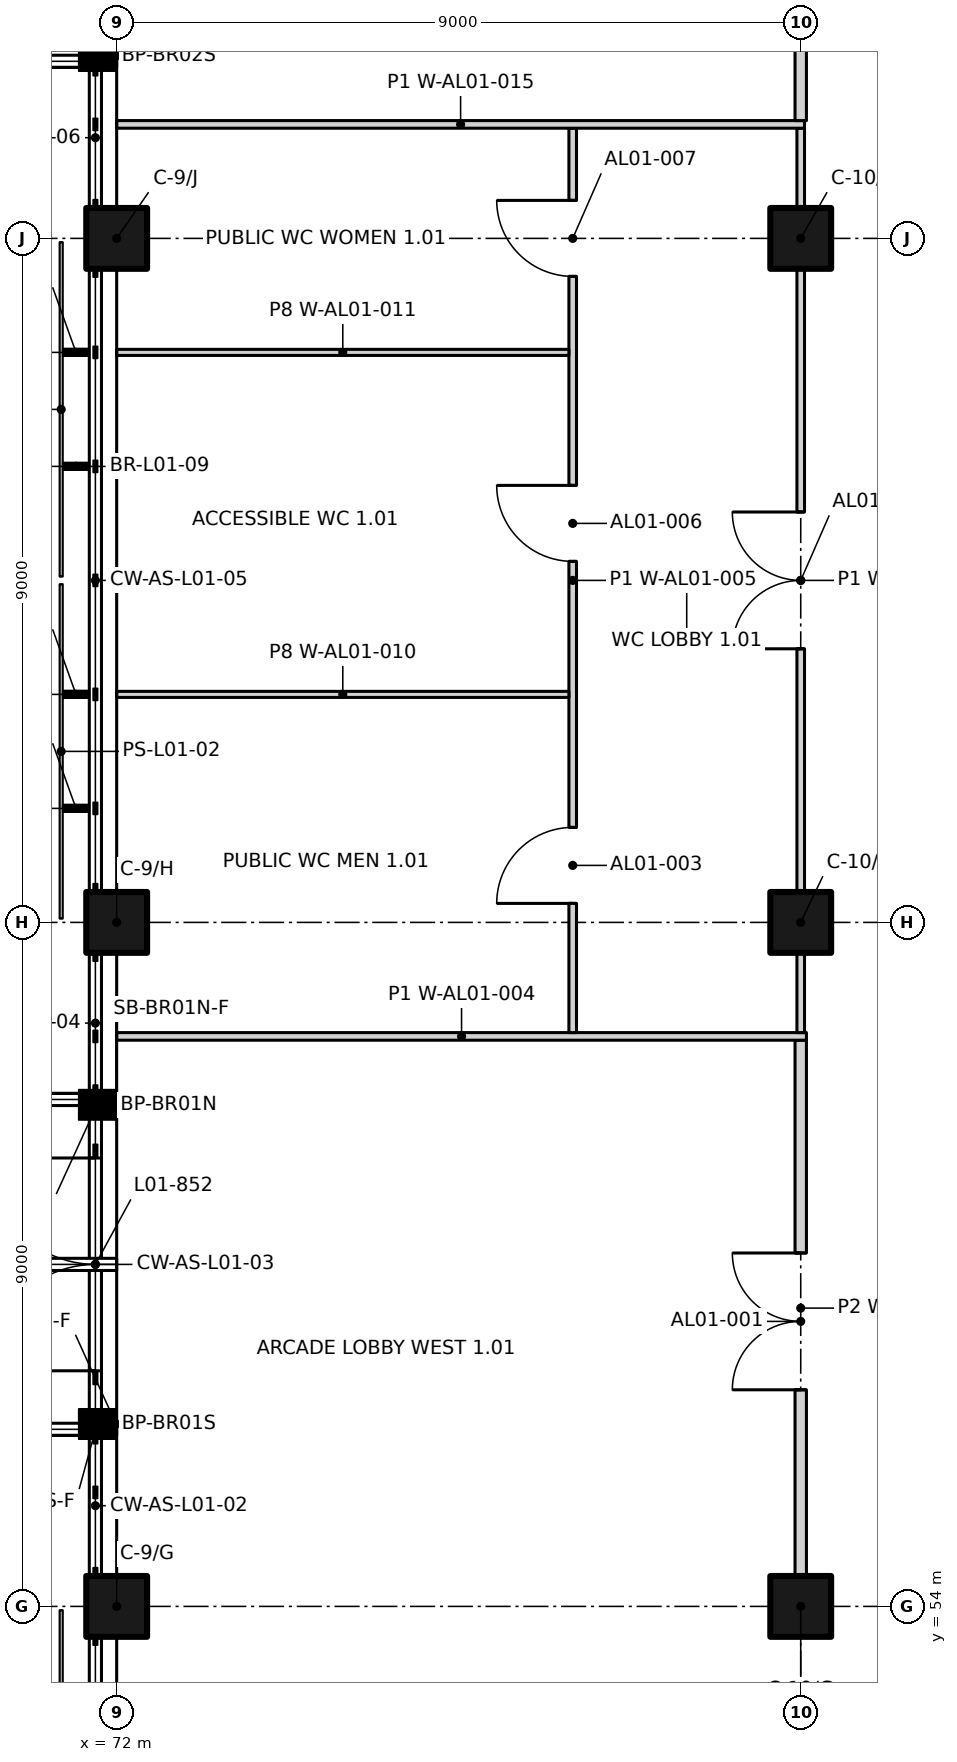
"""IFC4 building model, lengths in metres.
Left out: names, types, materials, properties, quantities, classifications, styles, units other than length and angle.
Written with IfcOpenShell. Run it as: python <this file> out.ifc"""

import sys

from ifc_helpers import new_model, si_unit, direction, frame, frame_2d, origin, origin_2d, place, context, subcontext, project, spatial, rectangle, extrude, element, fill, save


model = new_model("IFC4")
c1 = context("Model", 3, precision=1e-05, world=origin(), true_north=direction((0.0, 1.0)))
c2 = subcontext(c1, "Body", "Model", "MODEL_VIEW")
j1 = project(units=[si_unit("LENGTHUNIT", "METRE"), si_unit("PLANEANGLEUNIT", "RADIAN")], contexts=[c1])
p1 = place(None, origin())
s1 = spatial("IfcSite", under=j1, at=p1, CompositionType="ELEMENT")
p2 = place(p1, origin())
s2 = spatial("IfcBuilding", under=s1, at=p2, CompositionType="ELEMENT")
p3 = place(p2, frame((0.0, 0.0, 6.0)))
s3 = spatial("IfcBuildingStorey", under=s2, at=p3, CompositionType="ELEMENT", Elevation=6.0)
for number, where, z_axis, x_axis in (
    (1, (72.0, 54.0, 0.0), (0.0, 0.0, 1.0), (1.0, 0.0, 0.0)),
    (2, (81.0, 54.0, 0.0), (0.0, 0.0, 1.0), (1.0, 0.0, 0.0)),
    (3, (72.0, 63.0, 0.0), (0.0, 0.0, 1.0), (1.0, 0.0, 0.0)),
    (4, (81.0, 63.0, 0.0), (0.0, 0.0, 1.0), (1.0, 0.0, 0.0)),
    (5, (72.0, 72.0, 0.0), (0.0, 0.0, 1.0), (1.0, 0.0, 0.0)),
    (6, (81.0, 72.0, 0.0), (0.0, 0.0, 1.0), (1.0, 0.0, 0.0)),
):
    element("IfcColumn", number, at=place(p3, frame(where, z_axis=z_axis, x_axis=x_axis)), inside=s3, PredefinedType="COLUMN", context=c2, shape_type="SweptSolid", body=[
        extrude(rectangle(XDim=0.8, YDim=0.8, at=origin_2d()), origin(), (0.0, 0.0, 1.0), 4.5),
    ])
p4 = place(p3, frame((71.72, 57.03, 0.0), z_axis=(0.0, 0.0, 1.0), x_axis=(0.0, 1.0, 0.0)))
e7 = element("IfcWall", 7, at=p4, inside=s3, PredefinedType="STANDARD", context=c2, shape_type="SweptSolid", body=[
    extrude(rectangle(XDim=2.94, YDim=0.12, at=frame_2d((1.47, 0.0))), origin(), (0.0, 0.0, 1.0), 2.97),
])
p5 = place(p4, frame((0.07, 0.0, 0.0)))
e8 = element("IfcOpeningElement", 8, at=p5, cuts=e7, PredefinedType="OPENING", context=c2, shape_type="SweptSolid", body=[
    extrude(rectangle(XDim=2.8, YDim=2.4, at=frame_2d((1.4, 1.2))), frame((0.0, 0.07, 0.0), z_axis=(0.0, -1.0, 0.0), x_axis=(1.0, 0.0, 0.0)), (0.0, 0.0, 1.0), 0.14),
])
p6 = place(p3, frame((81.0, 54.4, 0.0), z_axis=(0.0, 0.0, 1.0), x_axis=(0.0, 1.0, 0.0)))
e9 = element("IfcWall", 9, at=p6, inside=s3, PredefinedType="PARTITIONING", context=c2, shape_type="SweptSolid", body=[
    extrude(rectangle(XDim=7.05, YDim=0.15, at=frame_2d((3.525, 0.0))), origin(), (0.0, 0.0, 1.0), 3.7),
])
p7 = place(p6, frame((2.45, 0.0, 0.0)))
e10 = element("IfcOpeningElement", 10, at=p7, cuts=e9, PredefinedType="OPENING", context=c2, shape_type="SweptSolid", body=[
    extrude(rectangle(XDim=1.8, YDim=2.1, at=frame_2d((0.9, 1.05))), frame((0.0, 0.085, 0.0), z_axis=(0.0, -1.0, 0.0), x_axis=(1.0, 0.0, 0.0)), (0.0, 0.0, 1.0), 0.17),
])
p8 = place(p3, frame((72.0, 61.5, 0.0), z_axis=(0.0, 0.0, 1.0), x_axis=(1.0, 0.0, 0.0)))
e11 = element("IfcWall", 11, at=p8, inside=s3, PredefinedType="PARTITIONING", context=c2, shape_type="SweptSolid", body=[
    extrude(rectangle(XDim=9.075, YDim=0.1, at=frame_2d((4.538, 0.0))), origin(), (0.0, 0.0, 1.0), 3.45),
])
p9 = place(p3, frame((78.0, 61.55, 0.0), z_axis=(0.0, 0.0, 1.0), x_axis=(0.0, 1.0, 0.0)))
e12 = element("IfcWall", 12, at=p9, inside=s3, PredefinedType="PARTITIONING", context=c2, shape_type="SweptSolid", body=[
    extrude(rectangle(XDim=11.9, YDim=0.1, at=frame_2d((5.95, 0.0))), origin(), (0.0, 0.0, 1.0), 4.15),
])
p10 = place(p9, frame((1.7, 0.0, 0.0)))
e13 = element("IfcOpeningElement", 13, at=p10, cuts=e12, PredefinedType="OPENING", context=c2, shape_type="SweptSolid", body=[
    extrude(rectangle(XDim=1.0, YDim=2.1, at=frame_2d((0.5, 1.05))), frame((0.0, 0.06, 0.0), z_axis=(0.0, -1.0, 0.0), x_axis=(1.0, 0.0, 0.0)), (0.0, 0.0, 1.0), 0.12),
])
p11 = place(p9, frame((6.2, 0.0, 0.0)))
e14 = element("IfcOpeningElement", 14, at=p11, cuts=e12, PredefinedType="OPENING", context=c2, shape_type="SweptSolid", body=[
    extrude(rectangle(XDim=1.0, YDim=2.1, at=frame_2d((0.5, 1.05))), frame((0.0, 0.06, 0.0), z_axis=(0.0, -1.0, 0.0), x_axis=(1.0, 0.0, 0.0)), (0.0, 0.0, 1.0), 0.12),
])
p12 = place(p9, frame((9.95, 0.0, 0.0)))
e15 = element("IfcOpeningElement", 15, at=p12, cuts=e12, PredefinedType="OPENING", context=c2, shape_type="SweptSolid", body=[
    extrude(rectangle(XDim=1.0, YDim=2.1, at=frame_2d((0.5, 1.05))), frame((0.0, 0.06, 0.0), z_axis=(0.0, -1.0, 0.0), x_axis=(1.0, 0.0, 0.0)), (0.0, 0.0, 1.0), 0.12),
])
p13 = place(p3, frame((81.0, 61.55, 0.0), z_axis=(0.0, 0.0, 1.0), x_axis=(0.0, 1.0, 0.0)))
e16 = element("IfcWall", 16, at=p13, inside=s3, PredefinedType="PARTITIONING", context=c2, shape_type="SweptSolid", body=[
    extrude(rectangle(XDim=1.05, YDim=0.1, at=frame_2d((0.525, 0.0))), origin(), (0.0, 0.0, 1.0), 3.7),
])
p14 = place(p3, frame((81.0, 63.4, 0.0), z_axis=(0.0, 0.0, 1.0), x_axis=(0.0, 1.0, 0.0)))
e17 = element("IfcWall", 17, at=p14, inside=s3, PredefinedType="PARTITIONING", context=c2, shape_type="SweptSolid", body=[
    extrude(rectangle(XDim=8.2, YDim=0.1, at=frame_2d((4.1, 0.0))), origin(), (0.0, 0.0, 1.0), 3.7),
])
p15 = place(p14, frame((3.2, 0.0, 0.0)))
e18 = element("IfcOpeningElement", 18, at=p15, cuts=e17, PredefinedType="OPENING", context=c2, shape_type="SweptSolid", body=[
    extrude(rectangle(XDim=1.8, YDim=2.1, at=frame_2d((0.9, 1.05))), frame((0.0, 0.06, 0.0), z_axis=(0.0, -1.0, 0.0), x_axis=(1.0, 0.0, 0.0)), (0.0, 0.0, 1.0), 0.12),
])
for number, where, z_axis, x_axis in (
    (19, (72.0, 66.0, 0.0), (0.0, 0.0, 1.0), (1.0, 0.0, 0.0)),
    (20, (72.0, 70.5, 0.0), (0.0, 0.0, 1.0), (1.0, 0.0, 0.0)),
):
    element("IfcWall", number, at=place(p3, frame(where, z_axis=z_axis, x_axis=x_axis)), inside=s3, PredefinedType="PARTITIONING", context=c2, shape_type="SweptSolid", body=[
        extrude(rectangle(XDim=5.95, YDim=0.08, at=frame_2d((2.975, 0.0))), origin(), (0.0, 0.0, 1.0), 3.7),
    ])
p16 = place(p3, frame((81.0, 72.4, 0.0), z_axis=(0.0, 0.0, 1.0), x_axis=(0.0, 1.0, 0.0)))
e21 = element("IfcWall", 21, at=p16, inside=s3, PredefinedType="PARTITIONING", context=c2, shape_type="SweptSolid", body=[
    extrude(rectangle(XDim=1.05, YDim=0.1, at=frame_2d((0.525, 0.0))), origin(), (0.0, 0.0, 1.0), 3.7),
])
p17 = place(p3, frame((72.0, 73.5, 0.0), z_axis=(0.0, 0.0, 1.0), x_axis=(1.0, 0.0, 0.0)))
e22 = element("IfcWall", 22, at=p17, inside=s3, PredefinedType="PARTITIONING", context=c2, shape_type="SweptSolid", body=[
    extrude(rectangle(XDim=9.05, YDim=0.1, at=frame_2d((4.525, 0.0))), origin(), (0.0, 0.0, 1.0), 3.45),
])
p18 = place(p3, frame((81.0, 73.55, 0.0), z_axis=(0.0, 0.0, 1.0), x_axis=(0.0, 1.0, 0.0)))
e23 = element("IfcWall", 23, at=p18, inside=s3, PredefinedType="PARTITIONING", context=c2, shape_type="SweptSolid", body=[
    extrude(rectangle(XDim=7.05, YDim=0.15, at=frame_2d((3.525, 0.0))), origin(), (0.0, 0.0, 1.0), 3.7),
])
p19 = place(p5, origin())
e24 = element("IfcDoor", 24, at=p19, inside=s3, OperationType="DOUBLE_DOOR_SINGLE_SWING", PredefinedType="DOOR", context=c2, shape_type="SweptSolid", body=[
    extrude(rectangle(XDim=2.8, YDim=2.4, at=frame_2d((1.4, 1.2))), frame((0.0, 0.025, 0.0), z_axis=(0.0, -1.0, 0.0), x_axis=(1.0, 0.0, 0.0)), (0.0, 0.0, 1.0), 0.05),
])
fill(e8, e24)
p20 = place(p7, origin())
e25 = element("IfcDoor", 25, at=p20, inside=s3, OperationType="DOUBLE_DOOR_SINGLE_SWING", PredefinedType="DOOR", context=c2, shape_type="SweptSolid", body=[
    extrude(rectangle(XDim=1.8, YDim=2.1, at=frame_2d((0.9, 1.05))), frame((0.0, 0.025, 0.0), z_axis=(0.0, -1.0, 0.0), x_axis=(1.0, 0.0, 0.0)), (0.0, 0.0, 1.0), 0.05),
])
fill(e10, e25)
p21 = place(p10, origin())
e26 = element("IfcDoor", 26, at=p21, inside=s3, OperationType="SINGLE_SWING_LEFT", PredefinedType="DOOR", context=c2, shape_type="SweptSolid", body=[
    extrude(rectangle(XDim=1.0, YDim=2.1, at=frame_2d((0.5, 1.05))), frame((0.0, 0.025, 0.0), z_axis=(0.0, -1.0, 0.0), x_axis=(1.0, 0.0, 0.0)), (0.0, 0.0, 1.0), 0.05),
])
fill(e13, e26)
p22 = place(p15, origin())
e27 = element("IfcDoor", 27, at=p22, inside=s3, OperationType="DOUBLE_DOOR_SINGLE_SWING", PredefinedType="DOOR", context=c2, shape_type="SweptSolid", body=[
    extrude(rectangle(XDim=1.8, YDim=2.1, at=frame_2d((0.9, 1.05))), frame((0.0, 0.025, 0.0), z_axis=(0.0, -1.0, 0.0), x_axis=(1.0, 0.0, 0.0)), (0.0, 0.0, 1.0), 0.05),
])
fill(e18, e27)
p23 = place(p11, origin())
e28 = element("IfcDoor", 28, at=p23, inside=s3, OperationType="SINGLE_SWING_RIGHT", PredefinedType="DOOR", context=c2, shape_type="SweptSolid", body=[
    extrude(rectangle(XDim=1.0, YDim=2.1, at=frame_2d((0.5, 1.05))), frame((0.0, 0.025, 0.0), z_axis=(0.0, -1.0, 0.0), x_axis=(1.0, 0.0, 0.0)), (0.0, 0.0, 1.0), 0.05),
])
fill(e14, e28)
p24 = place(p12, origin())
e29 = element("IfcDoor", 29, at=p24, inside=s3, OperationType="SINGLE_SWING_RIGHT", PredefinedType="DOOR", context=c2, shape_type="SweptSolid", body=[
    extrude(rectangle(XDim=1.0, YDim=2.1, at=frame_2d((0.5, 1.05))), frame((0.0, 0.025, 0.0), z_axis=(0.0, -1.0, 0.0), x_axis=(1.0, 0.0, 0.0)), (0.0, 0.0, 1.0), 0.05),
])
fill(e15, e29)
save(model, sys.argv[1])
